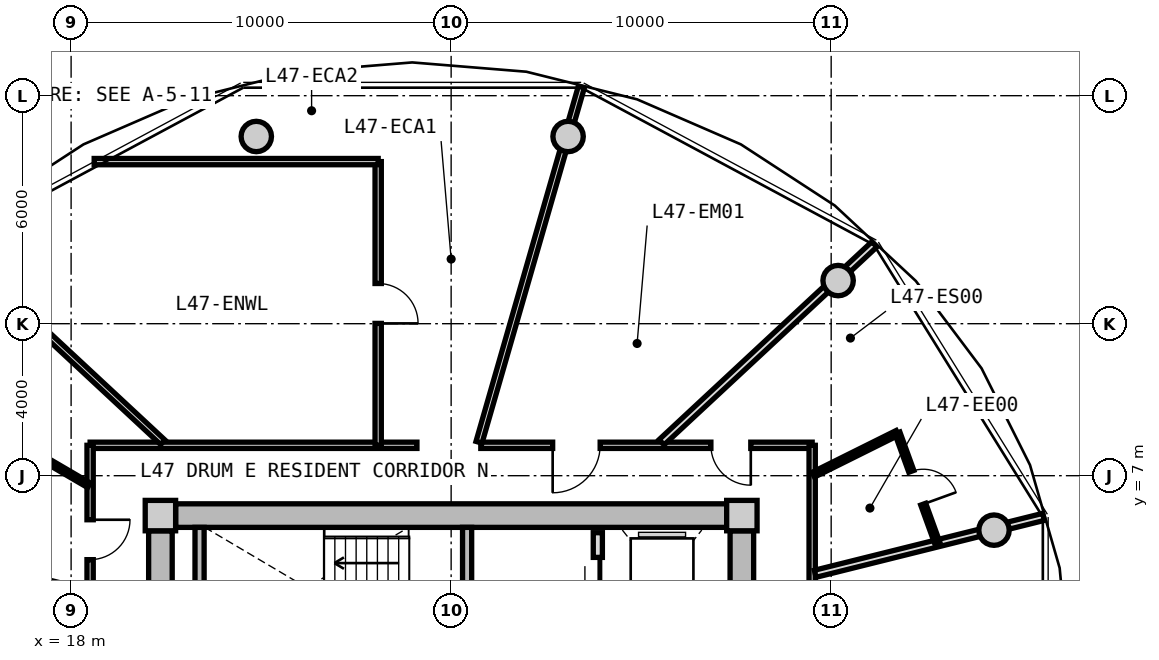
"""IFC4 building model, lengths in metres.
Left out: names, types, materials, properties, quantities, classifications, styles, units other than length and angle.
Written with IfcOpenShell. Run it as: python <this file> out.ifc"""

import sys

from ifc_helpers import new_model, si_unit, direction, frame, frame_2d, origin, origin_2d, place, context, subcontext, project, spatial, rectangle, circle, extrude, source, transform, mapped, element, fill, save


model = new_model("IFC4")
c1 = context("Model", 3, precision=1e-05, world=origin(), true_north=direction((0.0, 1.0)))
c2 = subcontext(c1, "Body", "Model", "MODEL_VIEW")
j1 = project(units=[si_unit("LENGTHUNIT", "METRE"), si_unit("PLANEANGLEUNIT", "RADIAN")], contexts=[c1])
p1 = place(None, origin())
s1 = spatial("IfcSite", under=j1, at=p1, CompositionType="ELEMENT")
p2 = place(p1, origin())
s2 = spatial("IfcBuilding", under=s1, at=p2, CompositionType="ELEMENT")
p3 = place(p2, frame((0.0, 0.0, 152.6)))
s3 = spatial("IfcBuildingStorey", under=s2, at=p3, CompositionType="ELEMENT", Elevation=152.6)
m1 = source(origin(), c2, "Body", "SweptSolid", [
    extrude(rectangle(XDim=0.8, YDim=0.8, at=origin_2d()), origin(), (0.0, 0.0, 1.0), 3.05),
])
for number, where, z_axis, x_axis in (
    (1, (35.65, 5.95, 0.0), (0.0, 0.0, 1.0), (1.0, 0.0, 0.0)),
    (2, (20.35, 5.95, 0.0), (0.0, 0.0, 1.0), (1.0, 0.0, 0.0)),
):
    element("IfcColumn", number, at=place(p3, frame(where, z_axis=z_axis, x_axis=x_axis)), inside=s3, PredefinedType="COLUMN", context=c2, shape_type="MappedRepresentation", body=[
        mapped(m1, transform((0.0, 0.0, 0.0), x_axis=(1.0, 0.0, 0.0), y_axis=(0.0, 1.0, 0.0), z_axis=(0.0, 0.0, 1.0), scale=1.0)),
    ])
m2 = source(origin(), c2, "Body", "SweptSolid", [
    extrude(rectangle(XDim=14.5, YDim=0.62, at=frame_2d((7.25, 0.0))), origin(), (0.0, 0.0, 1.0), 2.81),
])
p4 = place(p3, frame((20.75, 5.95, 0.0), z_axis=(0.0, 0.0, 1.0), x_axis=(1.0, 0.0, 0.0)))
e3 = element("IfcWall", 3, at=p4, inside=s3, PredefinedType="SHEAR", context=c2, shape_type="MappedRepresentation", body=[
    mapped(m2, transform((0.0, 0.0, 0.0), x_axis=(1.0, 0.0, 0.0), y_axis=(0.0, 1.0, 0.0), z_axis=(0.0, 0.0, 1.0), scale=1.0)),
])
m3 = source(origin(), c2, "Body", "SweptSolid", [
    extrude(rectangle(XDim=11.1, YDim=0.62, at=frame_2d((5.55, 0.0))), origin(), (0.0, 0.0, 1.0), 2.81),
])
p5 = place(p3, frame((20.35, -5.55, 0.0), z_axis=(0.0, 0.0, 1.0), x_axis=(0.0, 1.0, 0.0)))
e4 = element("IfcWall", 4, at=p5, inside=s3, PredefinedType="SHEAR", context=c2, shape_type="MappedRepresentation", body=[
    mapped(m3, transform((0.0, 0.0, 0.0), x_axis=(1.0, 0.0, 0.0), y_axis=(0.0, 1.0, 0.0), z_axis=(0.0, 0.0, 1.0), scale=1.0)),
])
p6 = place(p5, frame((3.8, 0.0, 0.0)))
e5 = element("IfcOpeningElement", 5, at=p6, cuts=e4, PredefinedType="OPENING", context=c2, shape_type="SweptSolid", body=[
    extrude(rectangle(XDim=1.2, YDim=2.15, at=frame_2d((0.6, 1.075))), frame((0.0, 0.32, 0.0), z_axis=(0.0, -1.0, 0.0), x_axis=(1.0, 0.0, 0.0)), (0.0, 0.0, 1.0), 0.64),
])
p7 = place(p3, frame((35.65, 5.55, 0.0), z_axis=(0.0, 0.0, 1.0), x_axis=(0.0, -1.0, 0.0)))
e6 = element("IfcWall", 6, at=p7, inside=s3, PredefinedType="SHEAR", context=c2, shape_type="MappedRepresentation", body=[
    mapped(m3, transform((0.0, 0.0, 0.0), x_axis=(1.0, 0.0, 0.0), y_axis=(0.0, 1.0, 0.0), z_axis=(0.0, 0.0, 1.0), scale=1.0)),
])
p8 = place(p7, frame((5.65, 0.0, 0.0)))
e7 = element("IfcOpeningElement", 7, at=p8, cuts=e6, PredefinedType="OPENING", context=c2, shape_type="SweptSolid", body=[
    extrude(rectangle(XDim=1.2, YDim=2.15, at=frame_2d((0.6, 1.075))), frame((0.0, 0.32, 0.0), z_axis=(0.0, -1.0, 0.0), x_axis=(1.0, 0.0, 0.0)), (0.0, 0.0, 1.0), 0.64),
])
p9 = place(p7, frame((9.3, 0.0, 0.0)))
e8 = element("IfcOpeningElement", 8, at=p9, cuts=e6, PredefinedType="OPENING", context=c2, shape_type="SweptSolid", body=[
    extrude(rectangle(XDim=1.0, YDim=2.1, at=frame_2d((0.5, 1.05))), frame((0.0, 0.32, 0.0), z_axis=(0.0, -1.0, 0.0), x_axis=(1.0, 0.0, 0.0)), (0.0, 0.0, 1.0), 0.64),
])
m4 = source(origin(), c2, "Body", "SweptSolid", [
    extrude(circle(Radius=0.4, at=origin_2d()), origin(), (0.0, 0.0, 1.0), 3.05),
])
for number, where, z_axis, x_axis in (
    (9, (42.285, 5.567, 0.0), (0.0, 0.0, 1.0), (1.0, 0.0, 0.0)),
    (10, (38.183, 12.135, 0.0), (0.0, 0.0, 1.0), (1.0, 0.0, 0.0)),
    (11, (31.077, 15.926, 0.0), (0.0, 0.0, 1.0), (1.0, 0.0, 0.0)),
    (12, (22.873, 15.926, 0.0), (0.0, 0.0, 1.0), (1.0, 0.0, 0.0)),
):
    element("IfcColumn", number, at=place(p3, frame(where, z_axis=z_axis, x_axis=x_axis)), inside=s3, PredefinedType="COLUMN", context=c2, shape_type="MappedRepresentation", body=[
        mapped(m4, transform((0.0, 0.0, 0.0), x_axis=(1.0, 0.0, 0.0), y_axis=(0.0, 1.0, 0.0), z_axis=(0.0, 0.0, 1.0), scale=1.0)),
    ])
m5 = source(origin(), c2, "Body", "SweptSolid", [
    extrude(rectangle(XDim=3.19, YDim=0.24, at=frame_2d((1.595, 0.0))), origin(), (0.0, 0.0, 1.0), 2.81),
])
p10 = place(p3, frame((21.38, 2.45, 0.0), z_axis=(0.0, 0.0, 1.0), x_axis=(0.0, 1.0, 0.0)))
e13 = element("IfcWall", 13, at=p10, inside=s3, PredefinedType="PARTITIONING", context=c2, shape_type="MappedRepresentation", body=[
    mapped(m5, transform((0.0, 0.0, 0.0), x_axis=(1.0, 0.0, 0.0), y_axis=(0.0, 1.0, 0.0), z_axis=(0.0, 0.0, 1.0), scale=1.0)),
])
p11 = place(p3, frame((28.42, 2.45, 0.0), z_axis=(0.0, 0.0, 1.0), x_axis=(0.0, 1.0, 0.0)))
e14 = element("IfcWall", 14, at=p11, inside=s3, PredefinedType="PARTITIONING", context=c2, shape_type="MappedRepresentation", body=[
    mapped(m5, transform((0.0, 0.0, 0.0), x_axis=(1.0, 0.0, 0.0), y_axis=(0.0, 1.0, 0.0), z_axis=(0.0, 0.0, 1.0), scale=1.0)),
])
p12 = place(p11, frame((0.55, 0.0, 0.0)))
e15 = element("IfcOpeningElement", 15, at=p12, cuts=e14, PredefinedType="OPENING", context=c2, shape_type="SweptSolid", body=[
    extrude(rectangle(XDim=1.1, YDim=2.15, at=frame_2d((0.55, 1.075))), frame((0.0, 0.13, 0.0), z_axis=(0.0, -1.0, 0.0), x_axis=(1.0, 0.0, 0.0)), (0.0, 0.0, 1.0), 0.26),
])
m6 = source(origin(), c2, "Body", "SweptSolid", [
    extrude(rectangle(XDim=5.0, YDim=0.24, at=frame_2d((2.5, 0.0))), origin(), (0.0, 0.0, 1.0), 2.795),
])
p13 = place(p3, frame((31.86, 0.5, 0.0), z_axis=(0.0, 0.0, 1.0), x_axis=(0.0, 1.0, 0.0)))
e16 = element("IfcWall", 16, at=p13, inside=s3, PredefinedType="PARTITIONING", context=c2, shape_type="MappedRepresentation", body=[
    mapped(m6, transform((0.0, 0.0, 0.0), x_axis=(1.0, 0.0, 0.0), y_axis=(0.0, 1.0, 0.0), z_axis=(0.0, 0.0, 1.0), scale=1.0)),
])
p14 = place(p13, frame((3.05, 0.0, 0.0)))
e17 = element("IfcOpeningElement", 17, at=p14, cuts=e16, PredefinedType="OPENING", context=c2, shape_type="SweptSolid", body=[
    extrude(rectangle(XDim=1.3, YDim=2.2, at=frame_2d((0.65, 1.1))), frame((0.0, 0.13, 0.0), z_axis=(0.0, -1.0, 0.0), x_axis=(1.0, 0.0, 0.0)), (0.0, 0.0, 1.0), 0.26),
])
p15 = place(p13, frame((0.55, 0.0, 0.0)))
e18 = element("IfcOpeningElement", 18, at=p15, cuts=e16, PredefinedType="OPENING", context=c2, shape_type="SweptSolid", body=[
    extrude(rectangle(XDim=1.3, YDim=2.2, at=frame_2d((0.65, 1.1))), frame((0.0, 0.13, 0.0), z_axis=(0.0, -1.0, 0.0), x_axis=(1.0, 0.0, 0.0)), (0.0, 0.0, 1.0), 0.26),
])
m7 = source(origin(), c2, "Body", "SweptSolid", [
    extrude(rectangle(XDim=8.6, YDim=0.165, at=frame_2d((4.3, 0.0))), origin(), (0.0, 0.0, 1.0), 2.795),
])
p16 = place(p3, frame((18.5, 7.8, 0.0), z_axis=(0.0, 0.0, 1.0), x_axis=(1.0, 0.0, 0.0)))
e19 = element("IfcWall", 19, at=p16, inside=s3, PredefinedType="PARTITIONING", context=c2, shape_type="MappedRepresentation", body=[
    mapped(m7, transform((0.0, 0.0, 0.0), x_axis=(1.0, 0.0, 0.0), y_axis=(0.0, 1.0, 0.0), z_axis=(0.0, 0.0, 1.0), scale=1.0)),
])
m8 = source(origin(), c2, "Body", "SweptSolid", [
    extrude(rectangle(XDim=8.719, YDim=0.165, at=frame_2d((4.36, 0.0))), origin(), (0.0, 0.0, 1.0), 2.795),
])
p17 = place(p3, frame((28.781, 7.8, 0.0), z_axis=(0.0, 0.0, 1.0), x_axis=(1.0, 0.0, 0.0)))
e20 = element("IfcWall", 20, at=p17, inside=s3, PredefinedType="PARTITIONING", context=c2, shape_type="MappedRepresentation", body=[
    mapped(m8, transform((0.0, 0.0, 0.0), x_axis=(1.0, 0.0, 0.0), y_axis=(0.0, 1.0, 0.0), z_axis=(0.0, 0.0, 1.0), scale=1.0)),
])
p18 = place(p17, frame((6.054, 0.0, 0.0)))
e21 = element("IfcOpeningElement", 21, at=p18, cuts=e20, PredefinedType="OPENING", context=c2, shape_type="SweptSolid", body=[
    extrude(rectangle(XDim=1.05, YDim=2.15, at=frame_2d((0.525, 1.075))), frame((0.0, 0.093, 0.0), z_axis=(0.0, -1.0, 0.0), x_axis=(1.0, 0.0, 0.0)), (0.0, 0.0, 1.0), 0.185),
])
p19 = place(p17, frame((1.891, 0.0, 0.0)))
e22 = element("IfcOpeningElement", 22, at=p19, cuts=e20, PredefinedType="OPENING", context=c2, shape_type="SweptSolid", body=[
    extrude(rectangle(XDim=1.25, YDim=2.2, at=frame_2d((0.625, 1.1))), frame((0.0, 0.093, 0.0), z_axis=(0.0, -1.0, 0.0), x_axis=(1.0, 0.0, 0.0)), (0.0, 0.0, 1.0), 0.185),
])
m9 = source(origin(), c2, "Body", "SweptSolid", [
    extrude(rectangle(XDim=15.6, YDim=0.165, at=frame_2d((7.8, 0.0))), origin(), (0.0, 0.0, 1.0), 2.795),
])
p20 = place(p3, frame((18.5, -7.8, 0.0), z_axis=(0.0, 0.0, 1.0), x_axis=(0.0, 1.0, 0.0)))
e23 = element("IfcWall", 23, at=p20, inside=s3, PredefinedType="PARTITIONING", context=c2, shape_type="MappedRepresentation", body=[
    mapped(m9, transform((0.0, 0.0, 0.0), x_axis=(1.0, 0.0, 0.0), y_axis=(0.0, 1.0, 0.0), z_axis=(0.0, 0.0, 1.0), scale=1.0)),
])
p21 = place(p20, frame((12.591, 0.0, 0.0)))
e24 = element("IfcOpeningElement", 24, at=p21, cuts=e23, PredefinedType="OPENING", context=c2, shape_type="SweptSolid", body=[
    extrude(rectangle(XDim=1.05, YDim=2.15, at=frame_2d((0.525, 1.075))), frame((0.0, 0.093, 0.0), z_axis=(0.0, -1.0, 0.0), x_axis=(1.0, 0.0, 0.0)), (0.0, 0.0, 1.0), 0.185),
])
p22 = place(p20, frame((8.081, 0.0, 0.0)))
e25 = element("IfcOpeningElement", 25, at=p22, cuts=e23, PredefinedType="OPENING", context=c2, shape_type="SweptSolid", body=[
    extrude(rectangle(XDim=1.05, YDim=2.15, at=frame_2d((0.525, 1.075))), frame((0.0, 0.093, 0.0), z_axis=(0.0, -1.0, 0.0), x_axis=(1.0, 0.0, 0.0)), (0.0, 0.0, 1.0), 0.185),
])
p23 = place(p20, frame((2.854, 0.0, 0.0)))
e26 = element("IfcOpeningElement", 26, at=p23, cuts=e23, PredefinedType="OPENING", context=c2, shape_type="SweptSolid", body=[
    extrude(rectangle(XDim=1.05, YDim=2.15, at=frame_2d((0.525, 1.075))), frame((0.0, 0.093, 0.0), z_axis=(0.0, -1.0, 0.0), x_axis=(1.0, 0.0, 0.0)), (0.0, 0.0, 1.0), 0.185),
])
p24 = place(p20, frame((0.452, 0.0, 0.0)))
e27 = element("IfcOpeningElement", 27, at=p24, cuts=e23, PredefinedType="OPENING", context=c2, shape_type="SweptSolid", body=[
    extrude(rectangle(XDim=0.92, YDim=2.1, at=frame_2d((0.46, 1.05))), frame((0.0, 0.093, 0.0), z_axis=(0.0, -1.0, 0.0), x_axis=(1.0, 0.0, 0.0)), (0.0, 0.0, 1.0), 0.185),
])
p25 = place(p3, frame((37.5, 7.8, 0.0), z_axis=(0.0, 0.0, 1.0), x_axis=(0.0, -1.0, 0.0)))
e28 = element("IfcWall", 28, at=p25, inside=s3, PredefinedType="PARTITIONING", context=c2, shape_type="MappedRepresentation", body=[
    mapped(m9, transform((0.0, 0.0, 0.0), x_axis=(1.0, 0.0, 0.0), y_axis=(0.0, 1.0, 0.0), z_axis=(0.0, 0.0, 1.0), scale=1.0)),
])
p26 = place(p25, frame((9.896, 0.0, 0.0)))
e29 = element("IfcOpeningElement", 29, at=p26, cuts=e28, PredefinedType="OPENING", context=c2, shape_type="SweptSolid", body=[
    extrude(rectangle(XDim=1.05, YDim=2.15, at=frame_2d((0.525, 1.075))), frame((0.0, 0.093, 0.0), z_axis=(0.0, -1.0, 0.0), x_axis=(1.0, 0.0, 0.0)), (0.0, 0.0, 1.0), 0.185),
])
p27 = place(p25, frame((4.306, 0.0, 0.0)))
e30 = element("IfcOpeningElement", 30, at=p27, cuts=e28, PredefinedType="OPENING", context=c2, shape_type="SweptSolid", body=[
    extrude(rectangle(XDim=1.05, YDim=2.15, at=frame_2d((0.525, 1.075))), frame((0.0, 0.093, 0.0), z_axis=(0.0, -1.0, 0.0), x_axis=(1.0, 0.0, 0.0)), (0.0, 0.0, 1.0), 0.185),
])
m10 = source(origin(), c2, "Body", "SweptSolid", [
    extrude(rectangle(XDim=9.73, YDim=0.165, at=frame_2d((4.865, 0.0))), origin(), (0.0, 0.0, 1.0), 2.345),
])
p28 = place(p3, frame((28.733, 7.88, 0.0), z_axis=(0.0, 0.0, 1.0), x_axis=(0.27679492614, 0.960929013436, 0.0)))
e31 = element("IfcWall", 31, at=p28, inside=s3, PredefinedType="PARTITIONING", context=c2, shape_type="MappedRepresentation", body=[
    mapped(m10, transform((0.0, 0.0, 0.0), x_axis=(1.0, 0.0, 0.0), y_axis=(0.0, 1.0, 0.0), z_axis=(0.0, 0.0, 1.0), scale=1.0)),
])
m11 = source(origin(), c2, "Body", "SweptSolid", [
    extrude(rectangle(XDim=7.648, YDim=0.165, at=frame_2d((3.824, 0.0))), origin(), (0.0, 0.0, 1.0), 2.345),
])
p29 = place(p3, frame((20.413, 7.88, 0.0), z_axis=(0.0, 0.0, 1.0), x_axis=(-0.732182665826, 0.681108320213, 0.0)))
e32 = element("IfcWall", 32, at=p29, inside=s3, PredefinedType="PARTITIONING", context=c2, shape_type="MappedRepresentation", body=[
    mapped(m11, transform((0.0, 0.0, 0.0), x_axis=(1.0, 0.0, 0.0), y_axis=(0.0, 1.0, 0.0), z_axis=(0.0, 0.0, 1.0), scale=1.0)),
])
m12 = source(origin(), c2, "Body", "SweptSolid", [
    extrude(rectangle(XDim=7.465, YDim=0.165, at=frame_2d((3.733, 0.0))), origin(), (0.0, 0.0, 1.0), 2.795),
])
p30 = place(p3, frame((26.08, 7.8, 0.0), z_axis=(0.0, 0.0, 1.0), x_axis=(0.0, 1.0, 0.0)))
e33 = element("IfcWall", 33, at=p30, inside=s3, PredefinedType="PARTITIONING", context=c2, shape_type="MappedRepresentation", body=[
    mapped(m12, transform((0.0, 0.0, 0.0), x_axis=(1.0, 0.0, 0.0), y_axis=(0.0, 1.0, 0.0), z_axis=(0.0, 0.0, 1.0), scale=1.0)),
])
p31 = place(p30, frame((3.208, 0.0, 0.0)))
e34 = element("IfcOpeningElement", 34, at=p31, cuts=e33, PredefinedType="OPENING", context=c2, shape_type="SweptSolid", body=[
    extrude(rectangle(XDim=1.05, YDim=2.15, at=frame_2d((0.525, 1.075))), frame((0.0, 0.093, 0.0), z_axis=(0.0, -1.0, 0.0), x_axis=(1.0, 0.0, 0.0)), (0.0, 0.0, 1.0), 0.185),
])
m13 = source(origin(), c2, "Body", "SweptSolid", [
    extrude(rectangle(XDim=7.473, YDim=0.165, at=frame_2d((3.737, 0.0))), origin(), (0.0, 0.0, 1.0), 2.795),
])
p32 = place(p3, frame((18.607, 15.265, 0.0), z_axis=(0.0, 0.0, 1.0), x_axis=(1.0, 0.0, 0.0)))
e35 = element("IfcWall", 35, at=p32, inside=s3, PredefinedType="PARTITIONING", context=c2, shape_type="MappedRepresentation", body=[
    mapped(m13, transform((0.0, 0.0, 0.0), x_axis=(1.0, 0.0, 0.0), y_axis=(0.0, 1.0, 0.0), z_axis=(0.0, 0.0, 1.0), scale=1.0)),
])
m14 = source(origin(), c2, "Body", "SweptSolid", [
    extrude(rectangle(XDim=8.305, YDim=0.19, at=frame_2d((4.153, 0.0))), origin(), (0.0, 0.0, 1.0), 2.345),
])
p33 = place(p3, frame((18.42, 3.908, 0.0), z_axis=(0.0, 0.0, 1.0), x_axis=(-0.970309994378, 0.241864662175, 0.0)))
e36 = element("IfcWall", 36, at=p33, inside=s3, PredefinedType="PARTITIONING", context=c2, shape_type="MappedRepresentation", body=[
    mapped(m14, transform((0.0, 0.0, 0.0), x_axis=(1.0, 0.0, 0.0), y_axis=(0.0, 1.0, 0.0), z_axis=(0.0, 0.0, 1.0), scale=1.0)),
])
m15 = source(origin(), c2, "Body", "SweptSolid", [
    extrude(rectangle(XDim=3.481, YDim=0.14, at=frame_2d((1.74, 0.0))), origin(), (0.0, 0.0, 1.0), 2.795),
])
p34 = place(p3, frame((18.47, 6.748, 0.0), z_axis=(0.0, 0.0, 1.0), x_axis=(-0.863310428788, 0.504673264148, 0.0)))
e37 = element("IfcWall", 37, at=p34, inside=s3, PredefinedType="PARTITIONING", context=c2, shape_type="MappedRepresentation", body=[
    mapped(m15, transform((0.0, 0.0, 0.0), x_axis=(1.0, 0.0, 0.0), y_axis=(0.0, 1.0, 0.0), z_axis=(0.0, 0.0, 1.0), scale=1.0)),
])
p35 = place(p34, frame((1.28, 0.0, 0.0)))
e38 = element("IfcOpeningElement", 38, at=p35, cuts=e37, PredefinedType="OPENING", context=c2, shape_type="SweptSolid", body=[
    extrude(rectangle(XDim=0.92, YDim=2.1, at=frame_2d((0.46, 1.05))), frame((0.0, 0.08, 0.0), z_axis=(0.0, -1.0, 0.0), x_axis=(1.0, 0.0, 0.0)), (0.0, 0.0, 1.0), 0.16),
])
m16 = source(origin(), c2, "Body", "SweptSolid", [
    extrude(rectangle(XDim=6.193, YDim=0.19, at=frame_2d((3.096, 0.0))), origin(), (0.0, 0.0, 1.0), 2.345),
])
p36 = place(p3, frame((37.58, 4.419, 0.0), z_axis=(0.0, 0.0, 1.0), x_axis=(0.970309243466, 0.241867674657, 0.0)))
e39 = element("IfcWall", 39, at=p36, inside=s3, PredefinedType="PARTITIONING", context=c2, shape_type="MappedRepresentation", body=[
    mapped(m16, transform((0.0, 0.0, 0.0), x_axis=(1.0, 0.0, 0.0), y_axis=(0.0, 1.0, 0.0), z_axis=(0.0, 0.0, 1.0), scale=1.0)),
])
m17 = source(origin(), c2, "Body", "SweptSolid", [
    extrude(rectangle(XDim=7.648, YDim=0.19, at=frame_2d((3.824, 0.0))), origin(), (0.0, 0.0, 1.0), 2.345),
])
p37 = place(p3, frame((33.538, 7.88, 0.0), z_axis=(0.0, 0.0, 1.0), x_axis=(0.732167856666, 0.681124239522, 0.0)))
e40 = element("IfcWall", 40, at=p37, inside=s3, PredefinedType="PARTITIONING", context=c2, shape_type="MappedRepresentation", body=[
    mapped(m17, transform((0.0, 0.0, 0.0), x_axis=(1.0, 0.0, 0.0), y_axis=(0.0, 1.0, 0.0), z_axis=(0.0, 0.0, 1.0), scale=1.0)),
])
m18 = source(origin(), c2, "Body", "SweptSolid", [
    extrude(rectangle(XDim=2.471, YDim=0.14, at=frame_2d((1.235, 0.0))), origin(), (0.0, 0.0, 1.0), 2.795),
])
p38 = place(p3, frame((37.53, 7.026, 0.0), z_axis=(0.0, 0.0, 1.0), x_axis=(0.895295102372, 0.445473545419, 0.0)))
e41 = element("IfcWall", 41, at=p38, inside=s3, PredefinedType="PARTITIONING", context=c2, shape_type="MappedRepresentation", body=[
    mapped(m18, transform((0.0, 0.0, 0.0), x_axis=(1.0, 0.0, 0.0), y_axis=(0.0, 1.0, 0.0), z_axis=(0.0, 0.0, 1.0), scale=1.0)),
])
m19 = source(origin(), c2, "Body", "SweptSolid", [
    extrude(rectangle(XDim=3.072, YDim=0.14, at=frame_2d((1.536, 0.0))), origin(), (0.0, 0.0, 1.0), 2.795),
])
p39 = place(p3, frame((39.742, 8.127, 0.0), z_axis=(0.0, 0.0, 1.0), x_axis=(0.340913456846, -0.94009468403, 0.0)))
e42 = element("IfcWall", 42, at=p39, inside=s3, PredefinedType="PARTITIONING", context=c2, shape_type="MappedRepresentation", body=[
    mapped(m19, transform((0.0, 0.0, 0.0), x_axis=(1.0, 0.0, 0.0), y_axis=(0.0, 1.0, 0.0), z_axis=(0.0, 0.0, 1.0), scale=1.0)),
])
p40 = place(p39, frame((1.076, 0.0, 0.0)))
e43 = element("IfcOpeningElement", 43, at=p40, cuts=e42, PredefinedType="OPENING", context=c2, shape_type="SweptSolid", body=[
    extrude(rectangle(XDim=0.92, YDim=2.1, at=frame_2d((0.46, 1.05))), frame((0.0, 0.08, 0.0), z_axis=(0.0, -1.0, 0.0), x_axis=(1.0, 0.0, 0.0)), (0.0, 0.0, 1.0), 0.16),
])
m20 = source(origin(), c2, "Body", "SweptSolid", [
    extrude(rectangle(XDim=1.3, YDim=2.2, at=frame_2d((0.65, 1.1))), frame((0.0, 0.025, 0.0), z_axis=(0.0, -1.0, 0.0), x_axis=(1.0, 0.0, 0.0)), (0.0, 0.0, 1.0), 0.05),
])
p41 = place(p14, origin())
e44 = element("IfcDoor", 44, at=p41, inside=s3, OperationType="SLIDING_TO_LEFT", PredefinedType="DOOR", context=c2, shape_type="MappedRepresentation", body=[
    mapped(m20, transform((0.0, 0.0, 0.0), x_axis=(1.0, 0.0, 0.0), y_axis=(0.0, 1.0, 0.0), z_axis=(0.0, 0.0, 1.0), scale=1.0)),
])
fill(e17, e44)
m21 = source(origin(), c2, "Body", "SweptSolid", [
    extrude(rectangle(XDim=1.05, YDim=2.15, at=frame_2d((0.525, 1.075))), frame((0.0, 0.025, 0.0), z_axis=(0.0, -1.0, 0.0), x_axis=(1.0, 0.0, 0.0)), (0.0, 0.0, 1.0), 0.05),
])
p42 = place(p31, frame((1.05, 0.0, 0.0), z_axis=(0.0, 0.0, 1.0), x_axis=(-1.0, 0.0, 0.0)))
e45 = element("IfcDoor", 45, at=p42, inside=s3, OperationType="SINGLE_SWING_RIGHT", PredefinedType="DOOR", context=c2, shape_type="MappedRepresentation", body=[
    mapped(m21, transform((0.0, 0.0, 0.0), x_axis=(1.0, 0.0, 0.0), y_axis=(0.0, 1.0, 0.0), z_axis=(0.0, 0.0, 1.0), scale=1.0)),
])
fill(e34, e45)
p43 = place(p21, frame((1.05, 0.0, 0.0), z_axis=(0.0, 0.0, 1.0), x_axis=(-1.0, 0.0, 0.0)))
e46 = element("IfcDoor", 46, at=p43, inside=s3, OperationType="SINGLE_SWING_LEFT", PredefinedType="DOOR", context=c2, shape_type="MappedRepresentation", body=[
    mapped(m21, transform((0.0, 0.0, 0.0), x_axis=(1.0, 0.0, 0.0), y_axis=(0.0, 1.0, 0.0), z_axis=(0.0, 0.0, 1.0), scale=1.0)),
])
fill(e24, e46)
p44 = place(p18, frame((1.05, 0.0, 0.0), z_axis=(0.0, 0.0, 1.0), x_axis=(-1.0, 0.0, 0.0)))
e47 = element("IfcDoor", 47, at=p44, inside=s3, OperationType="SINGLE_SWING_LEFT", PredefinedType="DOOR", context=c2, shape_type="MappedRepresentation", body=[
    mapped(m21, transform((0.0, 0.0, 0.0), x_axis=(1.0, 0.0, 0.0), y_axis=(0.0, 1.0, 0.0), z_axis=(0.0, 0.0, 1.0), scale=1.0)),
])
fill(e21, e47)
m22 = source(origin(), c2, "Body", "SweptSolid", [
    extrude(rectangle(XDim=0.92, YDim=2.1, at=frame_2d((0.46, 1.05))), frame((0.0, 0.025, 0.0), z_axis=(0.0, -1.0, 0.0), x_axis=(1.0, 0.0, 0.0)), (0.0, 0.0, 1.0), 0.05),
])
p45 = place(p40, origin())
e48 = element("IfcDoor", 48, at=p45, inside=s3, OperationType="SINGLE_SWING_RIGHT", PredefinedType="DOOR", context=c2, shape_type="MappedRepresentation", body=[
    mapped(m22, transform((0.0, 0.0, 0.0), x_axis=(1.0, 0.0, 0.0), y_axis=(0.0, 1.0, 0.0), z_axis=(0.0, 0.0, 1.0), scale=1.0)),
])
fill(e43, e48)
m23 = source(origin(), c2, "Body", "SweptSolid", [
    extrude(rectangle(XDim=1.25, YDim=2.2, at=frame_2d((0.625, 1.1))), frame((0.0, 0.025, 0.0), z_axis=(0.0, -1.0, 0.0), x_axis=(1.0, 0.0, 0.0)), (0.0, 0.0, 1.0), 0.05),
])
p46 = place(p19, frame((1.25, 0.0, 0.0), z_axis=(0.0, 0.0, 1.0), x_axis=(-1.0, 0.0, 0.0)))
e49 = element("IfcDoor", 49, at=p46, inside=s3, OperationType="SINGLE_SWING_RIGHT", PredefinedType="DOOR", context=c2, shape_type="MappedRepresentation", body=[
    mapped(m23, transform((0.0, 0.0, 0.0), x_axis=(1.0, 0.0, 0.0), y_axis=(0.0, 1.0, 0.0), z_axis=(0.0, 0.0, 1.0), scale=1.0)),
])
fill(e22, e49)
save(model, sys.argv[1])
